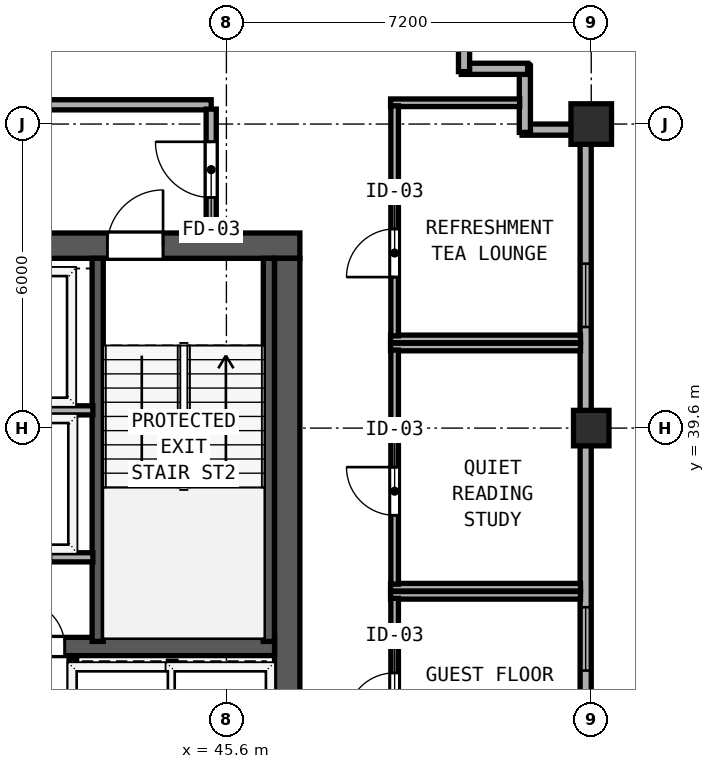
"""IFC4 building model, lengths in metres.
Left out: names, types, materials, properties, quantities, classifications, styles, units other than length and angle.
Written with IfcOpenShell. Run it as: python <this file> out.ifc"""

import sys

from ifc_helpers import new_model, si_unit, direction, frame, frame_2d, origin, origin_2d, place, context, subcontext, project, spatial, rectangle, hollow_rectangle, extrude, element, fill, save


model = new_model("IFC4")
c1 = context("Model", 3, precision=1e-05, world=origin(), true_north=direction((0.0, 1.0)))
c2 = subcontext(c1, "Body", "Model", "MODEL_VIEW")
j1 = project(units=[si_unit("LENGTHUNIT", "METRE"), si_unit("PLANEANGLEUNIT", "RADIAN")], contexts=[c1])
p1 = place(None, origin())
s1 = spatial("IfcSite", under=j1, at=p1, CompositionType="ELEMENT")
p2 = place(p1, origin())
s2 = spatial("IfcBuilding", under=s1, at=p2, CompositionType="ELEMENT")
p3 = place(p2, frame((0.0, 0.0, 258.3)))
s3 = spatial("IfcBuildingStorey", under=s2, at=p3, CompositionType="ELEMENT", Elevation=258.3)
p4 = place(p3, frame((29.75, 43.2, 0.0), z_axis=(0.0, 0.0, 1.0), x_axis=(1.0, 0.0, 0.0)))
e1 = element("IfcWall", 1, at=p4, inside=s3, PredefinedType="SHEAR", context=c2, shape_type="SweptSolid", body=[
    extrude(rectangle(XDim=17.3, YDim=0.5, at=frame_2d((8.65, 0.0))), origin(), (0.0, 0.0, 1.0), 3.67),
])
p5 = place(p4, frame((2.3, 0.0, 0.0)))
e2 = element("IfcOpeningElement", 2, at=p5, cuts=e1, PredefinedType="OPENING", context=c2, shape_type="SweptSolid", body=[
    extrude(rectangle(XDim=1.1, YDim=2.15, at=frame_2d((0.55, 1.075))), frame((0.0, 0.26, 0.0), z_axis=(0.0, -1.0, 0.0), x_axis=(1.0, 0.0, 0.0)), (0.0, 0.0, 1.0), 0.52),
])
p6 = place(p4, frame((7.41, 0.0, 0.0)))
e3 = element("IfcOpeningElement", 3, at=p6, cuts=e1, PredefinedType="OPENING", context=c2, shape_type="SweptSolid", body=[
    extrude(rectangle(XDim=1.1, YDim=2.15, at=frame_2d((0.55, 1.075))), frame((0.0, 0.26, 0.0), z_axis=(0.0, -1.0, 0.0), x_axis=(1.0, 0.0, 0.0)), (0.0, 0.0, 1.0), 0.52),
])
p7 = place(p4, frame((13.5, 0.0, 0.0)))
e4 = element("IfcOpeningElement", 4, at=p7, cuts=e1, PredefinedType="OPENING", context=c2, shape_type="SweptSolid", body=[
    extrude(rectangle(XDim=1.1, YDim=2.15, at=frame_2d((0.55, 1.075))), frame((0.0, 0.26, 0.0), z_axis=(0.0, -1.0, 0.0), x_axis=(1.0, 0.0, 0.0)), (0.0, 0.0, 1.0), 0.52),
])
p8 = place(p4, frame((4.63, 0.0, 0.0)))
e5 = element("IfcOpeningElement", 5, at=p8, cuts=e1, PredefinedType="OPENING", context=c2, shape_type="SweptSolid", body=[
    extrude(rectangle(XDim=1.1, YDim=2.2, at=frame_2d((0.55, 1.1))), frame((0.0, 0.26, 0.0), z_axis=(0.0, -1.0, 0.0), x_axis=(1.0, 0.0, 0.0)), (0.0, 0.0, 1.0), 0.52),
])
p9 = place(p4, frame((10.99, 0.0, 0.0)))
e6 = element("IfcOpeningElement", 6, at=p9, cuts=e1, PredefinedType="OPENING", context=c2, shape_type="SweptSolid", body=[
    extrude(rectangle(XDim=1.1, YDim=2.2, at=frame_2d((0.55, 1.1))), frame((0.0, 0.26, 0.0), z_axis=(0.0, -1.0, 0.0), x_axis=(1.0, 0.0, 0.0)), (0.0, 0.0, 1.0), 0.52),
])
p10 = place(p3, frame((46.8, 32.8, 0.0), z_axis=(0.0, 0.0, 1.0), x_axis=(0.0, 1.0, 0.0)))
e7 = element("IfcWall", 7, at=p10, inside=s3, PredefinedType="SHEAR", context=c2, shape_type="SweptSolid", body=[
    extrude(rectangle(XDim=10.15, YDim=0.5, at=frame_2d((5.075, 0.0))), origin(), (0.0, 0.0, 1.0), 3.67),
])
p11 = place(p3, frame((30.25, 35.29, 0.0), z_axis=(0.0, 0.0, 1.0), x_axis=(1.0, 0.0, 0.0)))
e8 = element("IfcWall", 8, at=p11, inside=s3, PredefinedType="SHEAR", context=c2, shape_type="SweptSolid", body=[
    extrude(rectangle(XDim=16.3, YDim=0.36, at=frame_2d((8.15, 0.0))), origin(), (0.0, 0.0, 1.0), 3.67),
])
p12 = place(p11, frame((5.1, 0.0, 0.0), z_axis=(0.0, 0.0, 1.0), x_axis=(-1.0, 0.0, 0.0)))
e9 = element("IfcOpeningElement", 9, at=p12, cuts=e8, PredefinedType="OPENING", context=c2, shape_type="SweptSolid", body=[
    extrude(rectangle(XDim=0.9, YDim=2.1, at=frame_2d((0.45, 1.05))), frame((0.0, 0.19, 0.0), z_axis=(0.0, -1.0, 0.0), x_axis=(1.0, 0.0, 0.0)), (0.0, 0.0, 1.0), 0.38),
])
p13 = place(p11, frame((12.16, 0.0, 0.0), z_axis=(0.0, 0.0, 1.0), x_axis=(-1.0, 0.0, 0.0)))
e10 = element("IfcOpeningElement", 10, at=p13, cuts=e8, PredefinedType="OPENING", context=c2, shape_type="SweptSolid", body=[
    extrude(rectangle(XDim=0.9, YDim=2.1, at=frame_2d((0.45, 1.05))), frame((0.0, 0.19, 0.0), z_axis=(0.0, -1.0, 0.0), x_axis=(1.0, 0.0, 0.0)), (0.0, 0.0, 1.0), 0.38),
])
for number, where, z_axis, x_axis in (
    (11, (43.06, 35.39, 0.0), (0.0, 0.0, 1.0), (0.0, 1.0, 0.0)),
    (12, (46.438, 35.39, 0.0), (0.0, 0.0, 1.0), (0.0, 1.0, 0.0)),
):
    element("IfcWall", number, at=place(p3, frame(where, z_axis=z_axis, x_axis=x_axis)), inside=s3, PredefinedType="SHEAR", context=c2, shape_type="SweptSolid", body=[
        extrude(rectangle(XDim=7.56, YDim=0.22, at=frame_2d((3.78, 0.0))), origin(), (0.0, 0.0, 1.0), 3.67),
    ])
p14 = place(p3, frame((52.8, 45.6, 0.0), z_axis=(0.0, 0.0, 1.0), x_axis=(1.0, 0.0, 0.0)))
e13 = element("IfcColumn", 13, at=p14, inside=s3, PredefinedType="COLUMN", context=c2, shape_type="SweptSolid", body=[
    extrude(hollow_rectangle(XDim=0.8, YDim=0.8, WallThickness=0.03, at=origin_2d()), origin(), (0.0, 0.0, 1.0), 3.85),
])
p15 = place(p3, frame((52.8, 39.6, 0.0), z_axis=(0.0, 0.0, 1.0), x_axis=(1.0, 0.0, 0.0)))
e14 = element("IfcColumn", 14, at=p15, inside=s3, PredefinedType="COLUMN", context=c2, shape_type="SweptSolid", body=[
    extrude(hollow_rectangle(XDim=0.7, YDim=0.7, WallThickness=0.026, at=origin_2d()), origin(), (0.0, 0.0, 1.0), 3.85),
])
p16 = place(p3, frame((52.69, 33.992, 0.0), z_axis=(0.0, 0.0, 1.0), x_axis=(0.0, 1.0, 0.0)))
e15 = element("IfcWall", 15, at=p16, inside=s3, PredefinedType="SOLIDWALL", context=c2, shape_type="SweptSolid", body=[
    extrude(rectangle(XDim=5.266, YDim=0.22, at=frame_2d((2.633, 0.0))), origin(), (0.0, 0.0, 1.0), 3.315),
])
p17 = place(p16, frame((0.823, 0.0, 0.85)))
e16 = element("IfcOpeningElement", 16, at=p17, cuts=e15, PredefinedType="OPENING", context=c2, shape_type="SweptSolid", body=[
    extrude(rectangle(XDim=1.25, YDim=1.95, at=frame_2d((0.625, 0.975))), frame((0.0, 0.12, 0.0), z_axis=(0.0, -1.0, 0.0), x_axis=(1.0, 0.0, 0.0)), (0.0, 0.0, 1.0), 0.24),
])
p18 = place(p3, frame((52.69, 39.942, 0.0), z_axis=(0.0, 0.0, 1.0), x_axis=(0.0, 1.0, 0.0)))
e17 = element("IfcWall", 17, at=p18, inside=s3, PredefinedType="SOLIDWALL", context=c2, shape_type="SweptSolid", body=[
    extrude(rectangle(XDim=5.266, YDim=0.22, at=frame_2d((2.633, 0.0))), origin(), (0.0, 0.0, 1.0), 3.315),
])
p19 = place(p18, frame((1.653, 0.0, 0.85)))
e18 = element("IfcOpeningElement", 18, at=p19, cuts=e17, PredefinedType="OPENING", context=c2, shape_type="SweptSolid", body=[
    extrude(rectangle(XDim=1.25, YDim=1.95, at=frame_2d((0.625, 0.975))), frame((0.0, 0.12, 0.0), z_axis=(0.0, -1.0, 0.0), x_axis=(1.0, 0.0, 0.0)), (0.0, 0.0, 1.0), 0.24),
])
p20 = place(p3, frame((52.408, 45.49, 0.0), z_axis=(0.0, 0.0, 1.0), x_axis=(-1.0, 0.0, 0.0)))
e19 = element("IfcWall", 19, at=p20, inside=s3, PredefinedType="SOLIDWALL", context=c2, shape_type="SweptSolid", body=[
    extrude(rectangle(XDim=0.973, YDim=0.22, at=frame_2d((0.486, 0.0))), origin(), (0.0, 0.0, 1.0), 3.67),
])
p21 = place(p3, frame((51.49, 45.435, 0.0), z_axis=(0.0, 0.0, 1.0), x_axis=(0.0, 1.0, 0.0)))
e20 = element("IfcWall", 20, at=p21, inside=s3, PredefinedType="SOLIDWALL", context=c2, shape_type="SweptSolid", body=[
    extrude(rectangle(XDim=1.31, YDim=0.22, at=frame_2d((0.655, 0.0))), origin(), (0.0, 0.0, 1.0), 3.67),
])
p22 = place(p3, frame((51.545, 46.69, 0.0), z_axis=(0.0, 0.0, 1.0), x_axis=(-1.0, 0.0, 0.0)))
e21 = element("IfcWall", 21, at=p22, inside=s3, PredefinedType="SOLIDWALL", context=c2, shape_type="SweptSolid", body=[
    extrude(rectangle(XDim=1.31, YDim=0.22, at=frame_2d((0.655, 0.0))), origin(), (0.0, 0.0, 1.0), 3.67),
])
p23 = place(p3, frame((50.29, 46.635, 0.0), z_axis=(0.0, 0.0, 1.0), x_axis=(0.0, 1.0, 0.0)))
e22 = element("IfcWall", 22, at=p23, inside=s3, PredefinedType="SOLIDWALL", context=c2, shape_type="SweptSolid", body=[
    extrude(rectangle(XDim=1.535, YDim=0.22, at=frame_2d((0.768, 0.0))), origin(), (0.0, 0.0, 1.0), 3.67),
])
p24 = place(p3, frame((31.5, 45.98, 0.0), z_axis=(0.0, 0.0, 1.0), x_axis=(1.0, 0.0, 0.0)))
e23 = element("IfcWall", 23, at=p24, inside=s3, PredefinedType="SOLIDWALL", context=c2, shape_type="SweptSolid", body=[
    extrude(rectangle(XDim=13.8, YDim=0.2, at=frame_2d((6.9, 0.0))), origin(), (0.0, 0.0, 1.0), 3.67),
])
p25 = place(p3, frame((45.3, 43.45, 0.0), z_axis=(0.0, 0.0, 1.0), x_axis=(0.0, 1.0, 0.0)))
e24 = element("IfcWall", 24, at=p25, inside=s3, PredefinedType="SOLIDWALL", context=c2, shape_type="SweptSolid", body=[
    extrude(rectangle(XDim=2.445, YDim=0.2, at=frame_2d((1.223, 0.0))), origin(), (0.0, 0.0, 1.0), 3.67),
])
p26 = place(p25, frame((0.7, 0.0, 0.0)))
e25 = element("IfcOpeningElement", 25, at=p26, cuts=e24, PredefinedType="OPENING", context=c2, shape_type="SweptSolid", body=[
    extrude(rectangle(XDim=1.1, YDim=2.15, at=frame_2d((0.55, 1.075))), frame((0.0, 0.11, 0.0), z_axis=(0.0, -1.0, 0.0), x_axis=(1.0, 0.0, 0.0)), (0.0, 0.0, 1.0), 0.22),
])
p27 = place(p3, frame((40.195, 39.95, 0.0), z_axis=(0.0, 0.0, 1.0), x_axis=(1.0, 0.0, 0.0)))
e26 = element("IfcWall", 26, at=p27, inside=s3, PredefinedType="SOLIDWALL", context=c2, shape_type="SweptSolid", body=[
    extrude(rectangle(XDim=2.77, YDim=0.18, at=frame_2d((1.385, 0.0))), origin(), (0.0, 0.0, 1.0), 3.67),
])
p28 = place(p3, frame((40.195, 37.05, 0.0), z_axis=(0.0, 0.0, 1.0), x_axis=(1.0, 0.0, 0.0)))
e27 = element("IfcWall", 27, at=p28, inside=s3, PredefinedType="SOLIDWALL", context=c2, shape_type="SweptSolid", body=[
    extrude(rectangle(XDim=2.77, YDim=0.18, at=frame_2d((1.385, 0.0))), origin(), (0.0, 0.0, 1.0), 3.67),
])
p29 = place(p28, frame((1.945, 0.0, 0.0), z_axis=(0.0, 0.0, 1.0), x_axis=(-1.0, 0.0, 0.0)))
e28 = element("IfcOpeningElement", 28, at=p29, cuts=e27, PredefinedType="OPENING", context=c2, shape_type="SweptSolid", body=[
    extrude(rectangle(XDim=1.2, YDim=2.2, at=frame_2d((0.6, 1.1))), frame((0.0, 0.1, 0.0), z_axis=(0.0, -1.0, 0.0), x_axis=(1.0, 0.0, 0.0)), (0.0, 0.0, 1.0), 0.2),
])
p30 = place(p3, frame((42.57, 32.88, 0.0), z_axis=(0.0, 0.0, 1.0), x_axis=(0.0, 1.0, 0.0)))
e29 = element("IfcWall", 29, at=p30, inside=s3, PredefinedType="SOLIDWALL", context=c2, shape_type="SweptSolid", body=[
    extrude(rectangle(XDim=2.17, YDim=0.15, at=frame_2d((1.085, 0.0))), origin(), (0.0, 0.0, 1.0), 3.67),
])
p31 = place(p3, frame((44.53, 32.95, 0.0), z_axis=(0.0, 0.0, 1.0), x_axis=(0.0, 1.0, 0.0)))
e30 = element("IfcWall", 30, at=p31, inside=s3, PredefinedType="SOLIDWALL", context=c2, shape_type="SweptSolid", body=[
    extrude(rectangle(XDim=2.05, YDim=0.15, at=frame_2d((1.025, 0.0))), origin(), (0.0, 0.0, 1.0), 3.67),
])
p32 = place(p3, frame((48.84, 36.3, 0.0), z_axis=(0.0, 0.0, 1.0), x_axis=(1.0, 0.0, 0.0)))
e31 = element("IfcWall", 31, at=p32, inside=s3, PredefinedType="PARTITIONING", context=c2, shape_type="SweptSolid", body=[
    extrude(rectangle(XDim=3.748, YDim=0.15, at=frame_2d((1.874, 0.0))), origin(), (0.0, 0.0, 1.0), 3.67),
])
p33 = place(p3, frame((48.92, 33.06, 0.0), z_axis=(0.0, 0.0, 1.0), x_axis=(0.0, 1.0, 0.0)))
e32 = element("IfcWall", 32, at=p33, inside=s3, PredefinedType="PARTITIONING", context=c2, shape_type="SweptSolid", body=[
    extrude(rectangle(XDim=3.18, YDim=0.15, at=frame_2d((1.59, 0.0))), origin(), (0.0, 0.0, 1.0), 3.67),
])
p34 = place(p33, frame((0.76, 0.0, 0.0)))
e33 = element("IfcOpeningElement", 33, at=p34, cuts=e32, PredefinedType="OPENING", context=c2, shape_type="SweptSolid", body=[
    extrude(rectangle(XDim=0.95, YDim=2.12, at=frame_2d((0.475, 1.06))), frame((0.0, 0.085, 0.0), z_axis=(0.0, -1.0, 0.0), x_axis=(1.0, 0.0, 0.0)), (0.0, 0.0, 1.0), 0.17),
])
for number, where, z_axis, x_axis in (
    (34, (48.84, 41.2, 0.0), (0.0, 0.0, 1.0), (1.0, 0.0, 0.0)),
    (35, (48.84, 36.46, 0.0), (0.0, 0.0, 1.0), (1.0, 0.0, 0.0)),
):
    element("IfcWall", number, at=place(p3, frame(where, z_axis=z_axis, x_axis=x_axis)), inside=s3, PredefinedType="PARTITIONING", context=c2, shape_type="SweptSolid", body=[
        extrude(rectangle(XDim=3.748, YDim=0.15, at=frame_2d((1.874, 0.0))), origin(), (0.0, 0.0, 1.0), 3.67),
    ])
p35 = place(p3, frame((48.92, 36.52, 0.0), z_axis=(0.0, 0.0, 1.0), x_axis=(0.0, 1.0, 0.0)))
e36 = element("IfcWall", 36, at=p35, inside=s3, PredefinedType="PARTITIONING", context=c2, shape_type="SweptSolid", body=[
    extrude(rectangle(XDim=4.62, YDim=0.15, at=frame_2d((2.31, 0.0))), origin(), (0.0, 0.0, 1.0), 3.67),
])
p36 = place(p35, frame((1.36, 0.0, 0.0)))
e37 = element("IfcOpeningElement", 37, at=p36, cuts=e36, PredefinedType="OPENING", context=c2, shape_type="SweptSolid", body=[
    extrude(rectangle(XDim=0.95, YDim=2.12, at=frame_2d((0.475, 1.06))), frame((0.0, 0.085, 0.0), z_axis=(0.0, -1.0, 0.0), x_axis=(1.0, 0.0, 0.0)), (0.0, 0.0, 1.0), 0.17),
])
p37 = place(p3, frame((48.84, 46.02, 0.0), z_axis=(0.0, 0.0, 1.0), x_axis=(1.0, 0.0, 0.0)))
e38 = element("IfcWall", 38, at=p37, inside=s3, PredefinedType="PARTITIONING", context=c2, shape_type="SweptSolid", body=[
    extrude(rectangle(XDim=2.548, YDim=0.15, at=frame_2d((1.274, 0.0))), origin(), (0.0, 0.0, 1.0), 3.67),
])
p38 = place(p3, frame((48.84, 41.36, 0.0), z_axis=(0.0, 0.0, 1.0), x_axis=(1.0, 0.0, 0.0)))
e39 = element("IfcWall", 39, at=p38, inside=s3, PredefinedType="PARTITIONING", context=c2, shape_type="SweptSolid", body=[
    extrude(rectangle(XDim=3.748, YDim=0.15, at=frame_2d((1.874, 0.0))), origin(), (0.0, 0.0, 1.0), 3.67),
])
p39 = place(p3, frame((48.92, 41.42, 0.0), z_axis=(0.0, 0.0, 1.0), x_axis=(0.0, 1.0, 0.0)))
e40 = element("IfcWall", 40, at=p39, inside=s3, PredefinedType="PARTITIONING", context=c2, shape_type="SweptSolid", body=[
    extrude(rectangle(XDim=4.54, YDim=0.15, at=frame_2d((2.27, 0.0))), origin(), (0.0, 0.0, 1.0), 3.67),
])
p40 = place(p39, frame((1.16, 0.0, 0.0)))
e41 = element("IfcOpeningElement", 41, at=p40, cuts=e40, PredefinedType="OPENING", context=c2, shape_type="SweptSolid", body=[
    extrude(rectangle(XDim=0.95, YDim=2.12, at=frame_2d((0.475, 1.06))), frame((0.0, 0.085, 0.0), z_axis=(0.0, -1.0, 0.0), x_axis=(1.0, 0.0, 0.0)), (0.0, 0.0, 1.0), 0.17),
])
p41 = place(p17, origin())
e42 = element("IfcWindow", 42, at=p41, inside=s3, PartitioningType="SINGLE_PANEL", PredefinedType="WINDOW", context=c2, shape_type="SweptSolid", body=[
    extrude(rectangle(XDim=1.25, YDim=1.95, at=frame_2d((0.625, 0.975))), frame((0.0, 0.03, 0.0), z_axis=(0.0, -1.0, 0.0), x_axis=(1.0, 0.0, 0.0)), (0.0, 0.0, 1.0), 0.06),
])
fill(e16, e42)
p42 = place(p19, origin())
e43 = element("IfcWindow", 43, at=p42, inside=s3, PartitioningType="SINGLE_PANEL", PredefinedType="WINDOW", context=c2, shape_type="SweptSolid", body=[
    extrude(rectangle(XDim=1.25, YDim=1.95, at=frame_2d((0.625, 0.975))), frame((0.0, 0.03, 0.0), z_axis=(0.0, -1.0, 0.0), x_axis=(1.0, 0.0, 0.0)), (0.0, 0.0, 1.0), 0.06),
])
fill(e18, e43)
p43 = place(p7, origin())
e44 = element("IfcDoor", 44, at=p43, inside=s3, OperationType="SINGLE_SWING_RIGHT", PredefinedType="DOOR", context=c2, shape_type="SweptSolid", body=[
    extrude(rectangle(XDim=1.1, YDim=2.15, at=frame_2d((0.55, 1.075))), frame((0.0, 0.185, 0.0), z_axis=(0.0, -1.0, 0.0), x_axis=(1.0, 0.0, 0.0)), (0.0, 0.0, 1.0), 0.05),
])
fill(e4, e44)
p44 = place(p26, origin())
e45 = element("IfcDoor", 45, at=p44, inside=s3, OperationType="SINGLE_SWING_RIGHT", PredefinedType="DOOR", context=c2, shape_type="SweptSolid", body=[
    extrude(rectangle(XDim=1.1, YDim=2.15, at=frame_2d((0.55, 1.075))), frame((0.0, 0.025, 0.0), z_axis=(0.0, -1.0, 0.0), x_axis=(1.0, 0.0, 0.0)), (0.0, 0.0, 1.0), 0.05),
])
fill(e25, e45)
p45 = place(p13, origin())
e46 = element("IfcDoor", 46, at=p45, inside=s3, OperationType="SINGLE_SWING_RIGHT", PredefinedType="DOOR", context=c2, shape_type="SweptSolid", body=[
    extrude(rectangle(XDim=0.9, YDim=2.1, at=frame_2d((0.45, 1.05))), frame((0.0, 0.025, 0.0), z_axis=(0.0, -1.0, 0.0), x_axis=(1.0, 0.0, 0.0)), (0.0, 0.0, 1.0), 0.05),
])
fill(e10, e46)
p46 = place(p34, origin())
e47 = element("IfcDoor", 47, at=p46, inside=s3, OperationType="SINGLE_SWING_LEFT", PredefinedType="DOOR", context=c2, shape_type="SweptSolid", body=[
    extrude(rectangle(XDim=0.95, YDim=2.12, at=frame_2d((0.475, 1.06))), frame((0.0, 0.025, 0.0), z_axis=(0.0, -1.0, 0.0), x_axis=(1.0, 0.0, 0.0)), (0.0, 0.0, 1.0), 0.05),
])
fill(e33, e47)
p47 = place(p36, origin())
e48 = element("IfcDoor", 48, at=p47, inside=s3, OperationType="SINGLE_SWING_RIGHT", PredefinedType="DOOR", context=c2, shape_type="SweptSolid", body=[
    extrude(rectangle(XDim=0.95, YDim=2.12, at=frame_2d((0.475, 1.06))), frame((0.0, 0.025, 0.0), z_axis=(0.0, -1.0, 0.0), x_axis=(1.0, 0.0, 0.0)), (0.0, 0.0, 1.0), 0.05),
])
fill(e37, e48)
p48 = place(p40, origin())
e49 = element("IfcDoor", 49, at=p48, inside=s3, OperationType="SINGLE_SWING_LEFT", PredefinedType="DOOR", context=c2, shape_type="SweptSolid", body=[
    extrude(rectangle(XDim=0.95, YDim=2.12, at=frame_2d((0.475, 1.06))), frame((0.0, 0.025, 0.0), z_axis=(0.0, -1.0, 0.0), x_axis=(1.0, 0.0, 0.0)), (0.0, 0.0, 1.0), 0.05),
])
fill(e41, e49)
save(model, sys.argv[1])
